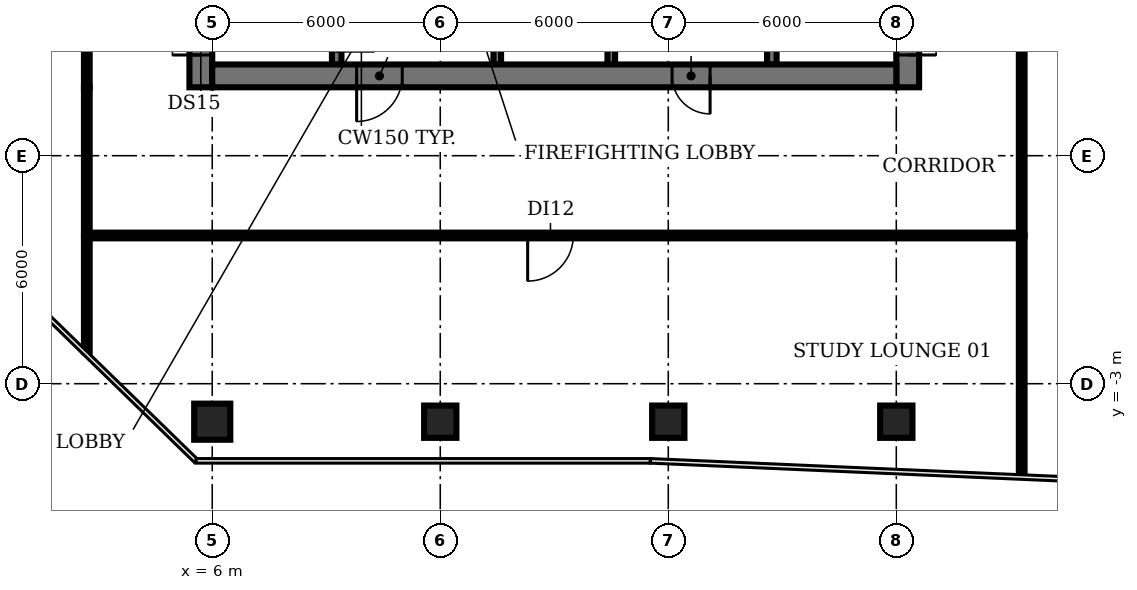
"""IFC4 building model, lengths in metres.
Left out: names, types, materials, properties, quantities, classifications, styles, units other than length and angle.
Written with IfcOpenShell. Run it as: python <this file> out.ifc"""

import sys

from ifc_helpers import new_model, si_unit, direction, frame, frame_2d, origin, origin_2d, place, context, subcontext, project, spatial, rectangle, circle, extrude, element, fill, save


model = new_model("IFC4")
c1 = context("Model", 3, precision=1e-05, world=origin(), true_north=direction((0.0, 1.0)))
c2 = subcontext(c1, "Body", "Model", "MODEL_VIEW")
j1 = project(units=[si_unit("LENGTHUNIT", "METRE"), si_unit("PLANEANGLEUNIT", "RADIAN")], contexts=[c1])
p1 = place(None, origin())
s1 = spatial("IfcSite", under=j1, at=p1, CompositionType="ELEMENT")
p2 = place(p1, origin())
s2 = spatial("IfcBuilding", under=s1, at=p2, CompositionType="ELEMENT")
p3 = place(p2, frame((0.0, 0.0, 159.2)))
s3 = spatial("IfcBuildingStorey", under=s2, at=p3, CompositionType="ELEMENT", Elevation=159.2)
p4 = place(p3, frame((6.0, -4.0, 0.0), z_axis=(0.0, 0.0, 1.0), x_axis=(1.0, 0.0, 0.0)))
e1 = element("IfcColumn", 1, at=p4, inside=s3, PredefinedType="COLUMN", context=c2, shape_type="SweptSolid", body=[
    extrude(circle(Radius=0.475, at=origin_2d()), origin(), (0.0, 0.0, 1.0), 3.85),
])
for number, where, z_axis, x_axis in (
    (2, (12.0, -4.0, 0.0), (0.0, 0.0, 1.0), (1.0, 0.0, 0.0)),
    (3, (18.0, -4.0, 0.0), (0.0, 0.0, 1.0), (1.0, 0.0, 0.0)),
    (4, (24.0, -4.0, 0.0), (0.0, 0.0, 1.0), (1.0, 0.0, 0.0)),
):
    element("IfcColumn", number, at=place(p3, frame(where, z_axis=z_axis, x_axis=x_axis)), inside=s3, PredefinedType="COLUMN", context=c2, shape_type="SweptSolid", body=[
        extrude(rectangle(XDim=0.85, YDim=0.85, at=origin_2d()), origin(), (0.0, 0.0, 1.0), 3.85),
    ])
p5 = place(p3, frame((9.275, 11.825, 0.0), z_axis=(0.0, 0.0, 1.0), x_axis=(0.0, -1.0, 0.0)))
e5 = element("IfcWall", 5, at=p5, inside=s3, PredefinedType="SHEAR", context=c2, shape_type="SweptSolid", body=[
    extrude(rectangle(XDim=6.425, YDim=0.25, at=frame_2d((3.212, 0.0))), origin(), (0.0, 0.0, 1.0), 3.85),
])
p6 = place(p5, frame((5.075, 0.0, 0.0)))
e6 = element("IfcOpeningElement", 6, at=p6, cuts=e5, PredefinedType="OPENING", context=c2, shape_type="SweptSolid", body=[
    extrude(rectangle(XDim=1.0, YDim=2.1, at=frame_2d((0.5, 1.05))), frame((0.0, 0.135, 0.0), z_axis=(0.0, -1.0, 0.0), x_axis=(1.0, 0.0, 0.0)), (0.0, 0.0, 1.0), 0.27),
])
p7 = place(p3, frame((13.5, 5.4, 0.0), z_axis=(0.0, 0.0, 1.0), x_axis=(0.0, 1.0, 0.0)))
e7 = element("IfcWall", 7, at=p7, inside=s3, PredefinedType="SHEAR", context=c2, shape_type="SweptSolid", body=[
    extrude(rectangle(XDim=8.2, YDim=0.2, at=frame_2d((4.1, 0.0))), origin(), (0.0, 0.0, 1.0), 3.85),
])
p8 = place(p7, frame((0.75, 0.0, 0.0)))
e8 = element("IfcOpeningElement", 8, at=p8, cuts=e7, PredefinedType="OPENING", context=c2, shape_type="SweptSolid", body=[
    extrude(rectangle(XDim=1.1, YDim=2.1, at=frame_2d((0.55, 1.05))), frame((0.0, 0.11, 0.0), z_axis=(0.0, -1.0, 0.0), x_axis=(1.0, 0.0, 0.0)), (0.0, 0.0, 1.0), 0.22),
])
p9 = place(p7, frame((3.55, 0.0, 0.0)))
e9 = element("IfcOpeningElement", 9, at=p9, cuts=e7, PredefinedType="OPENING", context=c2, shape_type="SweptSolid", body=[
    extrude(rectangle(XDim=1.1, YDim=2.1, at=frame_2d((0.55, 1.05))), frame((0.0, 0.11, 0.0), z_axis=(0.0, -1.0, 0.0), x_axis=(1.0, 0.0, 0.0)), (0.0, 0.0, 1.0), 0.22),
])
p10 = place(p7, frame((6.35, 0.0, 0.0)))
e10 = element("IfcOpeningElement", 10, at=p10, cuts=e7, PredefinedType="OPENING", context=c2, shape_type="SweptSolid", body=[
    extrude(rectangle(XDim=1.1, YDim=2.1, at=frame_2d((0.55, 1.05))), frame((0.0, 0.11, 0.0), z_axis=(0.0, -1.0, 0.0), x_axis=(1.0, 0.0, 0.0)), (0.0, 0.0, 1.0), 0.22),
])
p11 = place(p3, frame((16.5, 5.4, 0.0), z_axis=(0.0, 0.0, 1.0), x_axis=(0.0, 1.0, 0.0)))
e11 = element("IfcWall", 11, at=p11, inside=s3, PredefinedType="SHEAR", context=c2, shape_type="SweptSolid", body=[
    extrude(rectangle(XDim=8.2, YDim=0.2, at=frame_2d((4.1, 0.0))), origin(), (0.0, 0.0, 1.0), 3.85),
])
p12 = place(p3, frame((20.725, 5.4, 0.0), z_axis=(0.0, 0.0, 1.0), x_axis=(0.0, 1.0, 0.0)))
e12 = element("IfcWall", 12, at=p12, inside=s3, PredefinedType="SHEAR", context=c2, shape_type="SweptSolid", body=[
    extrude(rectangle(XDim=8.2, YDim=0.25, at=frame_2d((4.1, 0.0))), origin(), (0.0, 0.0, 1.0), 3.85),
])
p13 = place(p3, frame((5.7, 4.8, 0.0), z_axis=(0.0, 0.0, 1.0), x_axis=(0.0, 1.0, 0.0)))
e13 = element("IfcWall", 13, at=p13, inside=s3, PredefinedType="SHEAR", context=c2, shape_type="SweptSolid", body=[
    extrude(rectangle(XDim=20.6, YDim=0.6, at=frame_2d((10.3, 0.0))), origin(), (0.0, 0.0, 1.0), 3.85),
])
p14 = place(p13, frame((0.85, 0.0, 0.0)))
e14 = element("IfcOpeningElement", 14, at=p14, cuts=e13, PredefinedType="OPENING", context=c2, shape_type="SweptSolid", body=[
    extrude(rectangle(XDim=1.5, YDim=2.1, at=frame_2d((0.75, 1.05))), frame((0.0, 0.31, 0.0), z_axis=(0.0, -1.0, 0.0), x_axis=(1.0, 0.0, 0.0)), (0.0, 0.0, 1.0), 0.62),
])
p15 = place(p13, frame((7.3, 0.0, 0.0)))
e15 = element("IfcOpeningElement", 15, at=p15, cuts=e13, PredefinedType="OPENING", context=c2, shape_type="SweptSolid", body=[
    extrude(rectangle(XDim=1.2, YDim=2.1, at=frame_2d((0.6, 1.05))), frame((0.0, 0.31, 0.0), z_axis=(0.0, -1.0, 0.0), x_axis=(1.0, 0.0, 0.0)), (0.0, 0.0, 1.0), 0.62),
])
p16 = place(p13, frame((13.85, 0.0, 0.0)))
e16 = element("IfcOpeningElement", 16, at=p16, cuts=e13, PredefinedType="OPENING", context=c2, shape_type="SweptSolid", body=[
    extrude(rectangle(XDim=1.2, YDim=2.1, at=frame_2d((0.6, 1.05))), frame((0.0, 0.31, 0.0), z_axis=(0.0, -1.0, 0.0), x_axis=(1.0, 0.0, 0.0)), (0.0, 0.0, 1.0), 0.62),
])
p17 = place(p3, frame((24.3, 25.555, 0.0), z_axis=(0.0, 0.0, 1.0), x_axis=(0.0, -1.0, 0.0)))
e17 = element("IfcWall", 17, at=p17, inside=s3, PredefinedType="SHEAR", context=c2, shape_type="SweptSolid", body=[
    extrude(rectangle(XDim=20.755, YDim=0.6, at=frame_2d((10.377, 0.0))), origin(), (0.0, 0.0, 1.0), 3.85),
])
p18 = place(p17, frame((18.405, 0.0, 0.0)))
e18 = element("IfcOpeningElement", 18, at=p18, cuts=e17, PredefinedType="OPENING", context=c2, shape_type="SweptSolid", body=[
    extrude(rectangle(XDim=1.5, YDim=2.1, at=frame_2d((0.75, 1.05))), frame((0.0, 0.31, 0.0), z_axis=(0.0, -1.0, 0.0), x_axis=(1.0, 0.0, 0.0)), (0.0, 0.0, 1.0), 0.62),
])
p19 = place(p17, frame((12.305, 0.0, 0.0)))
e19 = element("IfcOpeningElement", 19, at=p19, cuts=e17, PredefinedType="OPENING", context=c2, shape_type="SweptSolid", body=[
    extrude(rectangle(XDim=0.9, YDim=2.1, at=frame_2d((0.45, 1.05))), frame((0.0, 0.31, 0.0), z_axis=(0.0, -1.0, 0.0), x_axis=(1.0, 0.0, 0.0)), (0.0, 0.0, 1.0), 0.62),
])
p20 = place(p17, frame((6.305, 0.0, 0.0)))
e20 = element("IfcOpeningElement", 20, at=p20, cuts=e17, PredefinedType="OPENING", context=c2, shape_type="SweptSolid", body=[
    extrude(rectangle(XDim=2.0, YDim=2.1, at=frame_2d((1.0, 1.05))), frame((0.0, 0.31, 0.0), z_axis=(0.0, -1.0, 0.0), x_axis=(1.0, 0.0, 0.0)), (0.0, 0.0, 1.0), 0.62),
])
p21 = place(p3, frame((24.0, 5.1, 0.0), z_axis=(0.0, 0.0, 1.0), x_axis=(-1.0, 0.0, 0.0)))
e21 = element("IfcWall", 21, at=p21, inside=s3, PredefinedType="SHEAR", context=c2, shape_type="SweptSolid", body=[
    extrude(rectangle(XDim=18.0, YDim=0.6, at=frame_2d((9.0, 0.0))), origin(), (0.0, 0.0, 1.0), 3.85),
])
p22 = place(p21, frame((13.0, 0.0, 0.0)))
e22 = element("IfcOpeningElement", 22, at=p22, cuts=e21, PredefinedType="OPENING", context=c2, shape_type="SweptSolid", body=[
    extrude(rectangle(XDim=1.2, YDim=2.1, at=frame_2d((0.6, 1.05))), frame((0.0, 0.31, 0.0), z_axis=(0.0, -1.0, 0.0), x_axis=(1.0, 0.0, 0.0)), (0.0, 0.0, 1.0), 0.62),
])
p23 = place(p21, frame((4.9, 0.0, 0.0)))
e23 = element("IfcOpeningElement", 23, at=p23, cuts=e21, PredefinedType="OPENING", context=c2, shape_type="SweptSolid", body=[
    extrude(rectangle(XDim=1.0, YDim=2.1, at=frame_2d((0.5, 1.05))), frame((0.0, 0.31, 0.0), z_axis=(0.0, -1.0, 0.0), x_axis=(1.0, 0.0, 0.0)), (0.0, 0.0, 1.0), 0.62),
])
p24 = place(p3, frame((2.7, -2.16, 0.0), z_axis=(0.0, 0.0, 1.0), x_axis=(0.0, 1.0, 0.0)))
e24 = element("IfcWall", 24, at=p24, inside=s3, PredefinedType="PARTITIONING", context=c2, shape_type="SweptSolid", body=[
    extrude(rectangle(XDim=3.06, YDim=0.15, at=frame_2d((1.53, 0.0))), origin(), (0.0, 0.0, 1.0), 2.88),
])
p25 = place(p3, frame((2.7, 0.9, 0.0), z_axis=(0.0, 0.0, 1.0), x_axis=(0.0, 1.0, 0.0)))
e25 = element("IfcWall", 25, at=p25, inside=s3, PredefinedType="PARTITIONING", context=c2, shape_type="SweptSolid", body=[
    extrude(rectangle(XDim=3.9, YDim=0.15, at=frame_2d((1.95, 0.0))), origin(), (0.0, 0.0, 1.0), 2.88),
])
p26 = place(p3, frame((2.7, 4.8, 0.0), z_axis=(0.0, 0.0, 1.0), x_axis=(0.0, 1.0, 0.0)))
e26 = element("IfcWall", 26, at=p26, inside=s3, PredefinedType="PARTITIONING", context=c2, shape_type="SweptSolid", body=[
    extrude(rectangle(XDim=20.6, YDim=0.15, at=frame_2d((10.3, 0.0))), origin(), (0.0, 0.0, 1.0), 2.88),
])
p27 = place(p26, frame((10.2, 0.0, 0.0)))
e27 = element("IfcOpeningElement", 27, at=p27, cuts=e26, PredefinedType="OPENING", context=c2, shape_type="SweptSolid", body=[
    extrude(rectangle(XDim=1.2, YDim=2.1, at=frame_2d((0.6, 1.05))), frame((0.0, 0.085, 0.0), z_axis=(0.0, -1.0, 0.0), x_axis=(1.0, 0.0, 0.0)), (0.0, 0.0, 1.0), 0.17),
])
p28 = place(p3, frame((27.3, -5.41, 0.0), z_axis=(0.0, 0.0, 1.0), x_axis=(0.0, 1.0, 0.0)))
e28 = element("IfcWall", 28, at=p28, inside=s3, PredefinedType="PARTITIONING", context=c2, shape_type="SweptSolid", body=[
    extrude(rectangle(XDim=6.31, YDim=0.15, at=frame_2d((3.155, 0.0))), origin(), (0.0, 0.0, 1.0), 2.88),
])
p29 = place(p3, frame((27.3, 0.9, 0.0), z_axis=(0.0, 0.0, 1.0), x_axis=(-1.0, 0.0, 0.0)))
e29 = element("IfcWall", 29, at=p29, inside=s3, PredefinedType="PARTITIONING", context=c2, shape_type="SweptSolid", body=[
    extrude(rectangle(XDim=24.6, YDim=0.15, at=frame_2d((12.3, 0.0))), origin(), (0.0, 0.0, 1.0), 2.88),
])
p30 = place(p29, frame((11.8, 0.0, 0.0)))
e30 = element("IfcOpeningElement", 30, at=p30, cuts=e29, PredefinedType="OPENING", context=c2, shape_type="SweptSolid", body=[
    extrude(rectangle(XDim=1.2, YDim=2.1, at=frame_2d((0.6, 1.05))), frame((0.0, 0.085, 0.0), z_axis=(0.0, -1.0, 0.0), x_axis=(1.0, 0.0, 0.0)), (0.0, 0.0, 1.0), 0.17),
])
p31 = place(p3, frame((27.3, 0.9, 0.0), z_axis=(0.0, 0.0, 1.0), x_axis=(0.0, 1.0, 0.0)))
e31 = element("IfcWall", 31, at=p31, inside=s3, PredefinedType="PARTITIONING", context=c2, shape_type="SweptSolid", body=[
    extrude(rectangle(XDim=13.9, YDim=0.15, at=frame_2d((6.95, 0.0))), origin(), (0.0, 0.0, 1.0), 2.88),
])
p32 = place(p14, origin())
e32 = element("IfcDoor", 32, at=p32, inside=s3, OperationType="DOUBLE_DOOR_SINGLE_SWING", PredefinedType="DOOR", context=c2, shape_type="SweptSolid", body=[
    extrude(rectangle(XDim=1.5, YDim=2.1, at=frame_2d((0.75, 1.05))), frame((0.0, 0.025, 0.0), z_axis=(0.0, -1.0, 0.0), x_axis=(1.0, 0.0, 0.0)), (0.0, 0.0, 1.0), 0.05),
])
fill(e14, e32)
p33 = place(p18, origin())
e33 = element("IfcDoor", 33, at=p33, inside=s3, OperationType="DOUBLE_DOOR_SINGLE_SWING", PredefinedType="DOOR", context=c2, shape_type="SweptSolid", body=[
    extrude(rectangle(XDim=1.5, YDim=2.1, at=frame_2d((0.75, 1.05))), frame((0.0, 0.025, 0.0), z_axis=(0.0, -1.0, 0.0), x_axis=(1.0, 0.0, 0.0)), (0.0, 0.0, 1.0), 0.05),
])
fill(e18, e33)
p34 = place(p22, origin())
e34 = element("IfcDoor", 34, at=p34, inside=s3, OperationType="SINGLE_SWING_RIGHT", PredefinedType="DOOR", context=c2, shape_type="SweptSolid", body=[
    extrude(rectangle(XDim=1.2, YDim=2.1, at=frame_2d((0.6, 1.05))), frame((0.0, 0.025, 0.0), z_axis=(0.0, -1.0, 0.0), x_axis=(1.0, 0.0, 0.0)), (0.0, 0.0, 1.0), 0.05),
])
fill(e22, e34)
p35 = place(p23, origin())
e35 = element("IfcDoor", 35, at=p35, inside=s3, OperationType="SINGLE_SWING_LEFT", PredefinedType="DOOR", context=c2, shape_type="SweptSolid", body=[
    extrude(rectangle(XDim=1.0, YDim=2.1, at=frame_2d((0.5, 1.05))), frame((0.0, -0.24, 0.0), z_axis=(0.0, -1.0, 0.0), x_axis=(1.0, 0.0, 0.0)), (0.0, 0.0, 1.0), 0.05),
])
fill(e23, e35)
p36 = place(p30, origin())
e36 = element("IfcDoor", 36, at=p36, inside=s3, OperationType="SINGLE_SWING_RIGHT", PredefinedType="DOOR", context=c2, shape_type="SweptSolid", body=[
    extrude(rectangle(XDim=1.2, YDim=2.1, at=frame_2d((0.6, 1.05))), frame((0.0, 0.025, 0.0), z_axis=(0.0, -1.0, 0.0), x_axis=(1.0, 0.0, 0.0)), (0.0, 0.0, 1.0), 0.05),
])
fill(e30, e36)
save(model, sys.argv[1])
